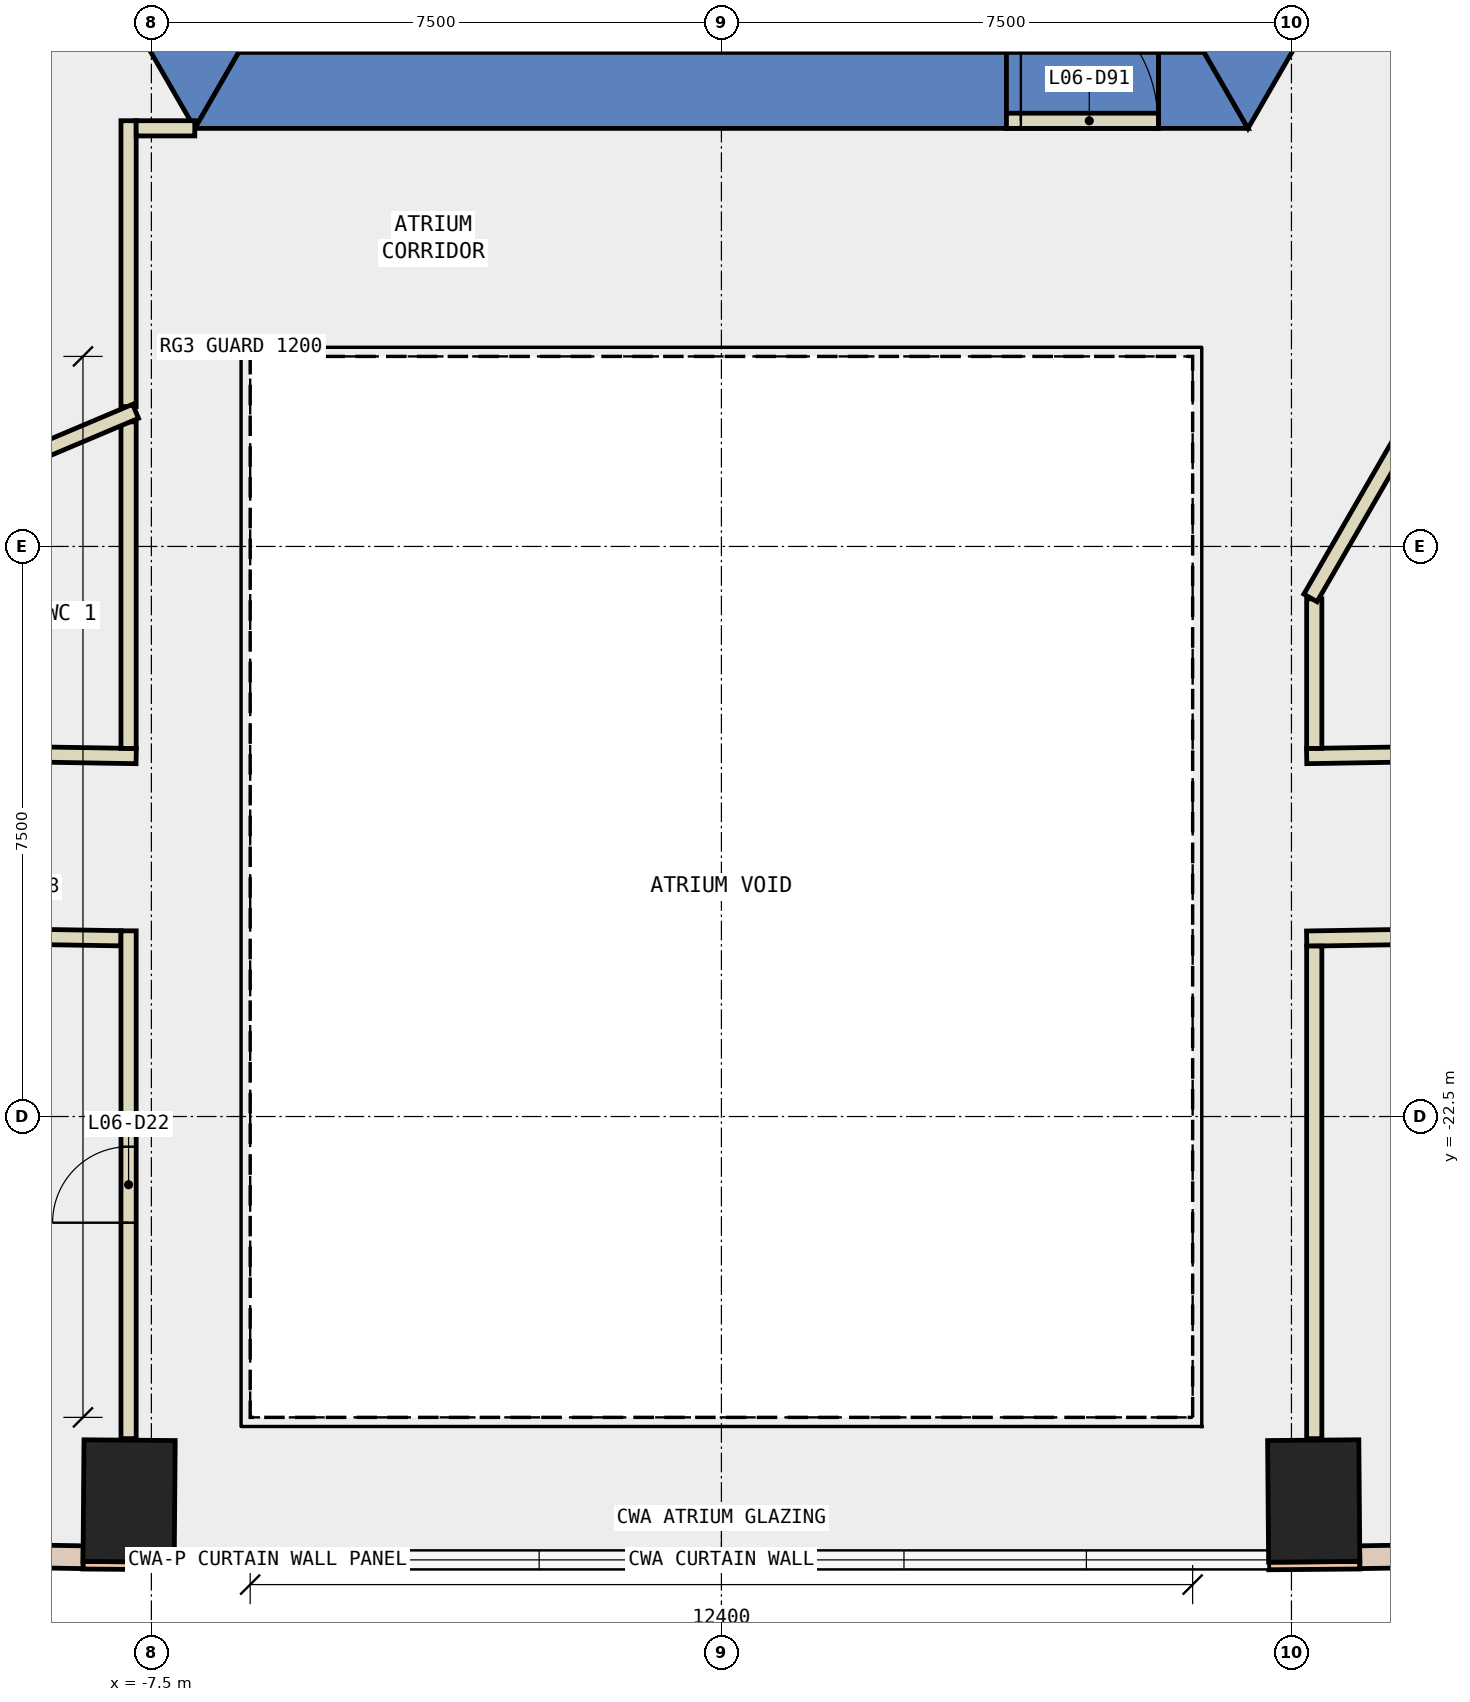
"""IFC4 building model, lengths in metres.
Left out: names, types, materials, properties, quantities, classifications, styles, units other than length and angle.
Written with IfcOpenShell. Run it as: python <this file> out.ifc"""

import sys

from ifc_helpers import new_model, si_unit, direction, frame, frame_2d, origin, origin_2d, place, context, subcontext, project, spatial, polyline, rectangle, outline, extrude, element, fill, save


model = new_model("IFC4")
c1 = context("Model", 3, precision=1e-05, world=origin(), true_north=direction((0.0, 1.0)))
c2 = subcontext(c1, "Body", "Model", "MODEL_VIEW")
j1 = project(units=[si_unit("LENGTHUNIT", "METRE"), si_unit("PLANEANGLEUNIT", "RADIAN")], contexts=[c1])
p1 = place(None, origin())
s1 = spatial("IfcSite", under=j1, at=p1, CompositionType="ELEMENT")
p2 = place(p1, origin())
s2 = spatial("IfcBuilding", under=s1, at=p2, CompositionType="ELEMENT")
p3 = place(p2, frame((0.0, 0.0, 35.0)))
s3 = spatial("IfcBuildingStorey", under=s2, at=p3, CompositionType="ELEMENT", Elevation=35.0)
for number, where, z_axis, x_axis in (
    (1, (-7.793, -27.558, -0.6), (0.0, 0.0, 1.0), (-1.0, 0.008, 0.0)),
    (2, (7.793, -27.558, -0.6), (0.0, 0.0, 1.0), (1.0, 0.008, 0.0)),
):
    element("IfcColumn", number, at=place(p3, frame(where, z_axis=z_axis, x_axis=x_axis)), inside=s3, PredefinedType="COLUMN", context=c2, shape_type="SweptSolid", body=[
        extrude(rectangle(XDim=1.2, YDim=1.6, at=origin_2d()), origin(), (0.0, 0.0, 1.0), 4.4),
    ])
p4 = place(p3, frame((0.0, 0.0, -0.6)))
e3 = element("IfcWall", 3, at=p4, inside=s3, PredefinedType="SHEAR", context=c2, shape_type="SweptSolid", body=[
    extrude(outline(polyline([(-13.856, 2.5), (-6.928, -9.5), (-6.351, -8.5), (-12.702, 2.5), (-13.856, 2.5)])), origin(), (0.0, 0.0, 1.0), 4.4),
])
p5 = place(p3, frame((0.0, 0.0, -0.6)))
e4 = element("IfcWall", 4, at=p5, inside=s3, PredefinedType="SHEAR", context=c2, shape_type="SweptSolid", body=[
    extrude(outline(polyline([(3.75, -9.5), (3.75, -8.5), (-6.351, -8.5), (-6.928, -9.5), (3.75, -9.5)])), origin(), (0.0, 0.0, 1.0), 4.4),
])
p6 = place(p3, frame((0.0, 0.0, -0.6)))
e5 = element("IfcWall", 5, at=p6, inside=s3, PredefinedType="SHEAR", context=c2, shape_type="SweptSolid", body=[
    extrude(outline(polyline([(5.75, -8.5), (5.75, -9.5), (6.928, -9.5), (6.351, -8.5), (5.75, -8.5)])), origin(), (0.0, 0.0, 1.0), 4.4),
])
p7 = place(p3, frame((0.0, 0.0, 3.6)))
e6 = element("IfcWall", 6, at=p7, inside=s3, PredefinedType="SHEAR", context=c2, shape_type="SweptSolid", body=[
    extrude(outline(polyline([(5.75, -9.5), (5.75, -8.5), (3.75, -8.5), (3.75, -9.5), (5.75, -9.5)])), origin(), (0.0, 0.0, 1.0), 0.2),
])
p8 = place(p3, frame((0.0, 0.0, -0.6)))
e7 = element("IfcWall", 7, at=p8, inside=s3, PredefinedType="SHEAR", context=c2, shape_type="SweptSolid", body=[
    extrude(outline(polyline([(8.117, -7.44), (7.252, -6.94), (6.351, -8.5), (6.928, -9.5), (8.117, -7.44)])), origin(), (0.0, 0.0, 1.0), 4.4),
])
for number, where, z_axis, x_axis in (
    (8, (-8.4, -28.403, 0.0), (0.0, 0.0, 1.0), (1.0, -0.008, 0.0)),
    (9, (7.2, -28.413, 0.0), (0.0, 0.0, 1.0), (1.0, 0.008, 0.0)),
):
    element("IfcWall", number, at=place(p3, frame(where, z_axis=z_axis, x_axis=x_axis)), inside=s3, PredefinedType="STANDARD", context=c2, shape_type="SweptSolid", body=[
        extrude(rectangle(XDim=1.2, YDim=0.1, at=frame_2d((0.6, 0.0))), origin(), (0.0, 0.0, 1.0), 3.8),
    ])
p9 = place(p3, frame((-15.568, -28.181, 0.0), z_axis=(0.0, 0.0, 1.0), x_axis=(0.999866467443, -0.016341581408, 0.0)))
e10 = element("IfcWall", 10, at=p9, inside=s3, PredefinedType="STANDARD", context=c2, shape_type="SweptSolid", body=[
    extrude(rectangle(XDim=7.171, YDim=0.3, at=frame_2d((3.585, 0.0))), origin(), (0.0, 0.0, 1.0), 3.8),
])
p10 = place(p9, frame((0.593, 0.0, 0.9)))
e11 = element("IfcOpeningElement", 11, at=p10, cuts=e10, PredefinedType="OPENING", context=c2, shape_type="SweptSolid", body=[
    extrude(rectangle(XDim=2.4, YDim=2.6, at=frame_2d((1.2, 1.3))), frame((0.0, 0.16, 0.0), z_axis=(0.0, -1.0, 0.0), x_axis=(1.0, 0.0, 0.0)), (0.0, 0.0, 1.0), 0.32),
])
p11 = place(p9, frame((4.178, 0.0, 0.9)))
e12 = element("IfcOpeningElement", 12, at=p11, cuts=e10, PredefinedType="OPENING", context=c2, shape_type="SweptSolid", body=[
    extrude(rectangle(XDim=2.4, YDim=2.6, at=frame_2d((1.2, 1.3))), frame((0.0, 0.16, 0.0), z_axis=(0.0, -1.0, 0.0), x_axis=(1.0, 0.0, 0.0)), (0.0, 0.0, 1.0), 0.32),
])
p12 = place(p3, frame((8.398, -28.298, 0.0), z_axis=(0.0, 0.0, 1.0), x_axis=(0.999866467443, 0.016341581408, 0.0)))
e13 = element("IfcWall", 13, at=p12, inside=s3, PredefinedType="STANDARD", context=c2, shape_type="SweptSolid", body=[
    extrude(rectangle(XDim=7.171, YDim=0.3, at=frame_2d((3.585, 0.0))), origin(), (0.0, 0.0, 1.0), 3.8),
])
p13 = place(p12, frame((0.593, 0.0, 0.9)))
e14 = element("IfcOpeningElement", 14, at=p13, cuts=e13, PredefinedType="OPENING", context=c2, shape_type="SweptSolid", body=[
    extrude(rectangle(XDim=2.4, YDim=2.6, at=frame_2d((1.2, 1.3))), frame((0.0, 0.16, 0.0), z_axis=(0.0, -1.0, 0.0), x_axis=(1.0, 0.0, 0.0)), (0.0, 0.0, 1.0), 0.32),
])
p14 = place(p12, frame((4.178, 0.0, 0.9)))
e15 = element("IfcOpeningElement", 15, at=p14, cuts=e13, PredefinedType="OPENING", context=c2, shape_type="SweptSolid", body=[
    extrude(rectangle(XDim=2.4, YDim=2.6, at=frame_2d((1.2, 1.3))), frame((0.0, 0.16, 0.0), z_axis=(0.0, -1.0, 0.0), x_axis=(1.0, 0.0, 0.0)), (0.0, 0.0, 1.0), 0.32),
])
p15 = place(p3, frame((7.7, -17.758, 0.0), z_axis=(0.0, 0.0, 1.0), x_axis=(0.999865574926, 0.016396099485, 0.0)))
e16 = element("IfcWall", 16, at=p15, inside=s3, PredefinedType="PARTITIONING", context=c2, shape_type="SweptSolid", body=[
    extrude(rectangle(XDim=8.234, YDim=0.2, at=frame_2d((4.117, 0.0))), origin(), (0.0, 0.0, 1.0), 3.8),
])
p16 = place(p3, frame((-15.73, -17.627, 0.0), z_axis=(0.0, 0.0, 1.0), x_axis=(0.999866746812, -0.016324479129, 0.0)))
e17 = element("IfcWall", 17, at=p16, inside=s3, PredefinedType="PARTITIONING", context=c2, shape_type="SweptSolid", body=[
    extrude(rectangle(XDim=8.031, YDim=0.2, at=frame_2d((4.016, 0.0))), origin(), (0.0, 0.0, 1.0), 3.8),
])
p17 = place(p16, frame((3.515, 0.0, 0.0)))
e18 = element("IfcOpeningElement", 18, at=p17, cuts=e17, PredefinedType="OPENING", context=c2, shape_type="SweptSolid", body=[
    extrude(rectangle(XDim=1.0, YDim=2.1, at=frame_2d((0.5, 1.05))), frame((0.0, 0.11, 0.0), z_axis=(0.0, -1.0, 0.0), x_axis=(1.0, 0.0, 0.0)), (0.0, 0.0, 1.0), 0.22),
])
p18 = place(p3, frame((16.061, -20.022, 0.0), z_axis=(0.0, 0.0, 1.0), x_axis=(-0.999865858466, -0.016378799504, 0.0)))
e19 = element("IfcWall", 19, at=p18, inside=s3, PredefinedType="PARTITIONING", context=c2, shape_type="SweptSolid", body=[
    extrude(rectangle(XDim=8.362, YDim=0.2, at=frame_2d((4.181, 0.0))), origin(), (0.0, 0.0, 1.0), 3.8),
])
p19 = place(p18, frame((3.681, 0.0, 0.0)))
e20 = element("IfcOpeningElement", 20, at=p19, cuts=e19, PredefinedType="OPENING", context=c2, shape_type="SweptSolid", body=[
    extrude(rectangle(XDim=1.0, YDim=2.1, at=frame_2d((0.5, 1.05))), frame((0.0, 0.11, 0.0), z_axis=(0.0, -1.0, 0.0), x_axis=(1.0, 0.0, 0.0)), (0.0, 0.0, 1.0), 0.22),
])
p20 = place(p3, frame((-7.9, -20.155, 0.0), z_axis=(0.0, 0.0, 1.0), x_axis=(-0.999867846419, 0.016256989184, 0.0)))
e21 = element("IfcWall", 21, at=p20, inside=s3, PredefinedType="PARTITIONING", context=c2, shape_type="SweptSolid", body=[
    extrude(rectangle(XDim=3.875, YDim=0.2, at=frame_2d((1.937, 0.0))), origin(), (0.0, 0.0, 1.0), 3.8),
])
p21 = place(p3, frame((7.8, -15.69, 0.0), z_axis=(0.0, 0.0, 1.0), x_axis=(0.0, -1.0, 0.0)))
e22 = element("IfcWall", 22, at=p21, inside=s3, PredefinedType="PARTITIONING", context=c2, shape_type="SweptSolid", body=[
    extrude(rectangle(XDim=1.967, YDim=0.2, at=frame_2d((0.983, 0.0))), origin(), (0.0, 0.0, 1.0), 3.8),
])
p22 = place(p3, frame((-7.8, -13.161, 0.0), z_axis=(0.0, 0.0, 1.0), x_axis=(0.0, 1.0, 0.0)))
e23 = element("IfcWall", 23, at=p22, inside=s3, PredefinedType="PARTITIONING", context=c2, shape_type="SweptSolid", body=[
    extrude(rectangle(XDim=3.762, YDim=0.2, at=frame_2d((1.881, 0.0))), origin(), (0.0, 0.0, 1.0), 3.8),
])
p23 = place(p3, frame((-7.7, -9.499, 0.0), z_axis=(0.0, 0.0, 1.0), x_axis=(1.0, 0.0, 0.0)))
e24 = element("IfcWall", 24, at=p23, inside=s3, PredefinedType="PARTITIONING", context=c2, shape_type="SweptSolid", body=[
    extrude(rectangle(XDim=0.771, YDim=0.2, at=frame_2d((0.385, 0.0))), origin(), (0.0, 0.0, 1.0), 3.8),
])
p24 = place(p3, frame((-7.8, -17.657, 0.0), z_axis=(0.0, 0.0, 1.0), x_axis=(0.0, 1.0, 0.0)))
e25 = element("IfcWall", 25, at=p24, inside=s3, PredefinedType="PARTITIONING", context=c2, shape_type="SweptSolid", body=[
    extrude(rectangle(XDim=4.296, YDim=0.2, at=frame_2d((2.148, 0.0))), origin(), (0.0, 0.0, 1.0), 3.8),
])
p25 = place(p3, frame((7.8, -20.257, 0.0), z_axis=(0.0, 0.0, 1.0), x_axis=(0.0, -1.0, 0.0)))
e26 = element("IfcWall", 26, at=p25, inside=s3, PredefinedType="PARTITIONING", context=c2, shape_type="SweptSolid", body=[
    extrude(rectangle(XDim=6.481, YDim=0.2, at=frame_2d((3.24, 0.0))), origin(), (0.0, 0.0, 1.0), 3.8),
])
p26 = place(p3, frame((-7.8, -26.738, 0.0), z_axis=(0.0, 0.0, 1.0), x_axis=(0.0, 1.0, 0.0)))
e27 = element("IfcWall", 27, at=p26, inside=s3, PredefinedType="PARTITIONING", context=c2, shape_type="SweptSolid", body=[
    extrude(rectangle(XDim=6.681, YDim=0.2, at=frame_2d((3.341, 0.0))), origin(), (0.0, 0.0, 1.0), 3.8),
])
p27 = place(p26, frame((2.841, 0.0, 0.0)))
e28 = element("IfcOpeningElement", 28, at=p27, cuts=e27, PredefinedType="OPENING", context=c2, shape_type="SweptSolid", body=[
    extrude(rectangle(XDim=1.0, YDim=2.1, at=frame_2d((0.5, 1.05))), frame((0.0, 0.11, 0.0), z_axis=(0.0, -1.0, 0.0), x_axis=(1.0, 0.0, 0.0)), (0.0, 0.0, 1.0), 0.22),
])
p28 = place(p3, frame((-7.708, -13.222, 0.0), z_axis=(0.0, 0.0, 1.0), x_axis=(-0.921093468555, -0.389341523839, 0.0)))
e29 = element("IfcWall", 29, at=p28, inside=s3, PredefinedType="PARTITIONING", context=c2, shape_type="SweptSolid", body=[
    extrude(rectangle(XDim=9.233, YDim=0.2, at=frame_2d((4.617, 0.0))), origin(), (0.0, 0.0, 1.0), 3.8),
])
p29 = place(p3, frame((3.75, -9.4, 0.0), z_axis=(0.0, 0.0, 1.0), x_axis=(1.0, 0.0, 0.0)))
e30 = element("IfcWall", 30, at=p29, inside=s3, PredefinedType="PARTITIONING", context=c2, shape_type="SweptSolid", body=[
    extrude(rectangle(XDim=2.0, YDim=0.2, at=frame_2d((1.0, 0.0))), origin(), (0.0, 0.0, 1.0), 2.4),
])
p30 = place(p29, frame((0.19, 0.0, 0.0)))
e31 = element("IfcOpeningElement", 31, at=p30, cuts=e30, PredefinedType="OPENING", context=c2, shape_type="SweptSolid", body=[
    extrude(rectangle(XDim=1.8, YDim=2.1, at=frame_2d((0.9, 1.05))), frame((0.0, 0.11, 0.0), z_axis=(0.0, -1.0, 0.0), x_axis=(1.0, 0.0, 0.0)), (0.0, 0.0, 1.0), 0.22),
])
p31 = place(p3, frame((12.401, -7.621, 0.0), z_axis=(0.0, 0.0, 1.0), x_axis=(-0.499983724212, -0.866034800411, 0.0)))
e32 = element("IfcWall", 32, at=p31, inside=s3, PredefinedType="PARTITIONING", context=c2, shape_type="SweptSolid", body=[
    extrude(rectangle(XDim=9.302, YDim=0.2, at=frame_2d((4.651, 0.0))), origin(), (0.0, 0.0, 1.0), 3.8),
])
p32 = place(p31, frame((1.429, 0.0, 0.0)))
e33 = element("IfcOpeningElement", 33, at=p32, cuts=e32, PredefinedType="OPENING", context=c2, shape_type="SweptSolid", body=[
    extrude(rectangle(XDim=1.0, YDim=2.1, at=frame_2d((0.5, 1.05))), frame((0.0, 0.11, 0.0), z_axis=(0.0, -1.0, 0.0), x_axis=(1.0, 0.0, 0.0)), (0.0, 0.0, 1.0), 0.22),
])
p33 = place(p31, frame((2.529, 0.0, 0.0)))
e34 = element("IfcOpeningElement", 34, at=p33, cuts=e32, PredefinedType="OPENING", context=c2, shape_type="SweptSolid", body=[
    extrude(rectangle(XDim=1.0, YDim=2.1, at=frame_2d((0.5, 1.05))), frame((0.0, 0.11, 0.0), z_axis=(0.0, -1.0, 0.0), x_axis=(1.0, 0.0, 0.0)), (0.0, 0.0, 1.0), 0.22),
])
p34 = place(p27, origin())
e35 = element("IfcDoor", 35, at=p34, inside=s3, OperationType="SINGLE_SWING_LEFT", PredefinedType="DOOR", context=c2, shape_type="SweptSolid", body=[
    extrude(rectangle(XDim=1.0, YDim=2.1, at=frame_2d((0.5, 1.05))), frame((0.0, 0.025, 0.0), z_axis=(0.0, -1.0, 0.0), x_axis=(1.0, 0.0, 0.0)), (0.0, 0.0, 1.0), 0.05),
])
fill(e28, e35)
p35 = place(p30, origin())
e36 = element("IfcDoor", 36, at=p35, inside=s3, OperationType="DOUBLE_DOOR_SINGLE_SWING", PredefinedType="DOOR", context=c2, shape_type="SweptSolid", body=[
    extrude(rectangle(XDim=1.8, YDim=2.1, at=frame_2d((0.9, 1.05))), frame((0.0, 0.025, 0.0), z_axis=(0.0, -1.0, 0.0), x_axis=(1.0, 0.0, 0.0)), (0.0, 0.0, 1.0), 0.05),
])
fill(e31, e36)
save(model, sys.argv[1])
